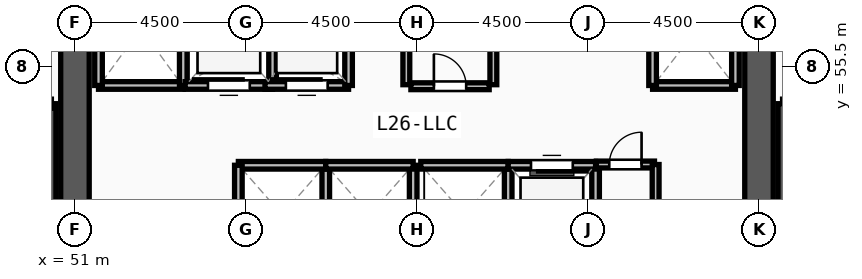
"""IFC4 building model, lengths in metres.
Left out: names, types, materials, properties, quantities, classifications, styles, units other than length and angle.
Written with IfcOpenShell. Run it as: python <this file> out.ifc"""

import sys

from ifc_helpers import new_model, si_unit, direction, frame, frame_2d, origin, place, context, subcontext, project, spatial, rectangle, extrude, source, transform, mapped, element, fill, save


model = new_model("IFC4")
c1 = context("Model", 3, precision=1e-05, world=origin(), true_north=direction((0.0, 1.0)))
c2 = subcontext(c1, "Body", "Model", "MODEL_VIEW")
j1 = project(units=[si_unit("LENGTHUNIT", "METRE"), si_unit("PLANEANGLEUNIT", "RADIAN")], contexts=[c1])
p1 = place(None, origin())
s1 = spatial("IfcSite", under=j1, at=p1, CompositionType="ELEMENT")
p2 = place(p1, origin())
s2 = spatial("IfcBuilding", under=s1, at=p2, CompositionType="ELEMENT")
p3 = place(p2, frame((0.0, 0.0, 102.0)))
s3 = spatial("IfcBuildingStorey", under=s2, at=p3, CompositionType="ELEMENT", Elevation=102.0)
p4 = place(p3, frame((69.0, 60.75, 0.0), z_axis=(0.0, 0.0, 1.0), x_axis=(0.0, -1.0, 0.0)))
e1 = element("IfcWall", 1, at=p4, inside=s3, PredefinedType="SHEAR", context=c2, shape_type="SweptSolid", body=[
    extrude(rectangle(XDim=13.5, YDim=0.75, at=frame_2d((6.75, 0.0))), origin(), (0.0, 0.0, 1.0), 3.57),
])
m1 = source(origin(), c2, "Body", "SweptSolid", [
    extrude(rectangle(XDim=1.2, YDim=2.2, at=frame_2d((0.6, 1.1))), frame((0.0, 0.385, 0.0), z_axis=(0.0, -1.0, 0.0), x_axis=(1.0, 0.0, 0.0)), (0.0, 0.0, 1.0), 0.77),
])
p5 = place(p4, frame((1.2, 0.0, 0.0)))
e2 = element("IfcOpeningElement", 2, at=p5, cuts=e1, PredefinedType="OPENING", context=c2, shape_type="MappedRepresentation", body=[
    mapped(m1, transform((0.0, 0.0, 0.0), x_axis=(1.0, 0.0, 0.0), y_axis=(0.0, 1.0, 0.0), z_axis=(0.0, 0.0, 1.0), scale=1.0)),
])
p6 = place(p3, frame((51.0, 47.25, 0.0), z_axis=(0.0, 0.0, 1.0), x_axis=(0.0, 1.0, 0.0)))
e3 = element("IfcWall", 3, at=p6, inside=s3, PredefinedType="SHEAR", context=c2, shape_type="SweptSolid", body=[
    extrude(rectangle(XDim=13.5, YDim=0.75, at=frame_2d((6.75, 0.0))), origin(), (0.0, 0.0, 1.0), 3.57),
])
for number, where, z_axis, x_axis in (
    (4, (50.38, 46.7, 0.0), (0.0, 0.0, 1.0), (0.0, 1.0, 0.0)),
    (5, (69.62, 54.52, 0.0), (0.0, 0.0, 1.0), (0.0, -1.0, 0.0)),
):
    element("IfcWall", number, at=place(p3, frame(where, z_axis=z_axis, x_axis=x_axis)), inside=s3, PredefinedType="SOLIDWALL", context=c2, shape_type="SweptSolid", body=[
        extrude(rectangle(XDim=7.82, YDim=0.24, at=frame_2d((3.91, 0.0))), origin(), (0.0, 0.0, 1.0), 3.57),
    ])
p7 = place(p3, frame((51.62, 55.0, 0.0), z_axis=(0.0, 0.0, 1.0), x_axis=(1.0, 0.0, 0.0)))
e6 = element("IfcWall", 6, at=p7, inside=s3, PredefinedType="SOLIDWALL", context=c2, shape_type="SweptSolid", body=[
    extrude(rectangle(XDim=2.23, YDim=0.2, at=frame_2d((1.115, 0.0))), origin(), (0.0, 0.0, 1.0), 3.57),
])
for number, where, z_axis, x_axis in (
    (7, (53.85, 55.0, 0.0), (0.0, 0.0, 1.0), (0.0, 1.0, 0.0)),
    (8, (51.62, 58.0, 0.0), (0.0, 0.0, 1.0), (0.0, -1.0, 0.0)),
):
    element("IfcWall", number, at=place(p3, frame(where, z_axis=z_axis, x_axis=x_axis)), inside=s3, PredefinedType="SOLIDWALL", context=c2, shape_type="SweptSolid", body=[
        extrude(rectangle(XDim=3.0, YDim=0.2, at=frame_2d((1.5, 0.0))), origin(), (0.0, 0.0, 1.0), 3.57),
    ])
p8 = place(p3, frame((66.2, 55.0, 0.0), z_axis=(0.0, 0.0, 1.0), x_axis=(1.0, 0.0, 0.0)))
e9 = element("IfcWall", 9, at=p8, inside=s3, PredefinedType="SOLIDWALL", context=c2, shape_type="SweptSolid", body=[
    extrude(rectangle(XDim=2.18, YDim=0.2, at=frame_2d((1.09, 0.0))), origin(), (0.0, 0.0, 1.0), 3.57),
])
for number, where, z_axis, x_axis in (
    (10, (68.38, 55.0, 0.0), (0.0, 0.0, 1.0), (0.0, 1.0, 0.0)),
    (11, (66.2, 57.75, 0.0), (0.0, 0.0, 1.0), (0.0, -1.0, 0.0)),
):
    element("IfcWall", number, at=place(p3, frame(where, z_axis=z_axis, x_axis=x_axis)), inside=s3, PredefinedType="SOLIDWALL", context=c2, shape_type="SweptSolid", body=[
        extrude(rectangle(XDim=2.75, YDim=0.2, at=frame_2d((1.375, 0.0))), origin(), (0.0, 0.0, 1.0), 3.57),
    ])
p9 = place(p3, frame((57.6, 50.3, 0.0), z_axis=(0.0, 0.0, 1.0), x_axis=(0.0, 1.0, 0.0)))
e12 = element("IfcWall", 12, at=p9, inside=s3, PredefinedType="SOLIDWALL", context=c2, shape_type="SweptSolid", body=[
    extrude(rectangle(XDim=2.6, YDim=0.2, at=frame_2d((1.3, 0.0))), origin(), (0.0, 0.0, 1.0), 3.57),
])
p10 = place(p3, frame((57.6, 52.9, 0.0), z_axis=(0.0, 0.0, 1.0), x_axis=(-1.0, 0.0, 0.0)))
e13 = element("IfcWall", 13, at=p10, inside=s3, PredefinedType="SOLIDWALL", context=c2, shape_type="SweptSolid", body=[
    extrude(rectangle(XDim=2.3, YDim=0.2, at=frame_2d((1.15, 0.0))), origin(), (0.0, 0.0, 1.0), 3.57),
])
for number, where, z_axis, x_axis in (
    (14, (55.3, 52.9, 0.0), (0.0, 0.0, 1.0), (0.0, -1.0, 0.0)),
    (15, (59.9, 50.3, 0.0), (0.0, 0.0, 1.0), (0.0, 1.0, 0.0)),
):
    element("IfcWall", number, at=place(p3, frame(where, z_axis=z_axis, x_axis=x_axis)), inside=s3, PredefinedType="SOLIDWALL", context=c2, shape_type="SweptSolid", body=[
        extrude(rectangle(XDim=2.6, YDim=0.2, at=frame_2d((1.3, 0.0))), origin(), (0.0, 0.0, 1.0), 3.57),
    ])
p11 = place(p3, frame((59.9, 52.9, 0.0), z_axis=(0.0, 0.0, 1.0), x_axis=(-1.0, 0.0, 0.0)))
e16 = element("IfcWall", 16, at=p11, inside=s3, PredefinedType="SOLIDWALL", context=c2, shape_type="SweptSolid", body=[
    extrude(rectangle(XDim=2.3, YDim=0.2, at=frame_2d((1.15, 0.0))), origin(), (0.0, 0.0, 1.0), 3.57),
])
p12 = place(p3, frame((62.4, 50.3, 0.0), z_axis=(0.0, 0.0, 1.0), x_axis=(0.0, 1.0, 0.0)))
e17 = element("IfcWall", 17, at=p12, inside=s3, PredefinedType="SOLIDWALL", context=c2, shape_type="SweptSolid", body=[
    extrude(rectangle(XDim=2.6, YDim=0.2, at=frame_2d((1.3, 0.0))), origin(), (0.0, 0.0, 1.0), 3.57),
])
p13 = place(p3, frame((62.4, 52.9, 0.0), z_axis=(0.0, 0.0, 1.0), x_axis=(-1.0, 0.0, 0.0)))
e18 = element("IfcWall", 18, at=p13, inside=s3, PredefinedType="SOLIDWALL", context=c2, shape_type="SweptSolid", body=[
    extrude(rectangle(XDim=2.3, YDim=0.2, at=frame_2d((1.15, 0.0))), origin(), (0.0, 0.0, 1.0), 3.57),
])
p14 = place(p3, frame((64.7, 50.3, 0.0), z_axis=(0.0, 0.0, 1.0), x_axis=(0.0, 1.0, 0.0)))
e19 = element("IfcWall", 19, at=p14, inside=s3, PredefinedType="SOLIDWALL", context=c2, shape_type="SweptSolid", body=[
    extrude(rectangle(XDim=2.6, YDim=0.2, at=frame_2d((1.3, 0.0))), origin(), (0.0, 0.0, 1.0), 3.57),
])
p15 = place(p3, frame((64.7, 52.9, 0.0), z_axis=(0.0, 0.0, 1.0), x_axis=(-1.0, 0.0, 0.0)))
e20 = element("IfcWall", 20, at=p15, inside=s3, PredefinedType="SOLIDWALL", context=c2, shape_type="SweptSolid", body=[
    extrude(rectangle(XDim=2.3, YDim=0.2, at=frame_2d((1.15, 0.0))), origin(), (0.0, 0.0, 1.0), 3.57),
])
m2 = source(origin(), c2, "Body", "SweptSolid", [
    extrude(rectangle(XDim=1.1, YDim=2.2, at=frame_2d((0.55, 1.1))), frame((0.0, 0.11, 0.0), z_axis=(0.0, -1.0, 0.0), x_axis=(1.0, 0.0, 0.0)), (0.0, 0.0, 1.0), 0.22),
])
p16 = place(p15, frame((0.6, 0.0, 0.0)))
e21 = element("IfcOpeningElement", 21, at=p16, cuts=e20, PredefinedType="OPENING", context=c2, shape_type="MappedRepresentation", body=[
    mapped(m2, transform((0.0, 0.0, 0.0), x_axis=(1.0, 0.0, 0.0), y_axis=(0.0, 1.0, 0.0), z_axis=(0.0, 0.0, 1.0), scale=1.0)),
])
p17 = place(p3, frame((53.9, 55.0, 0.0), z_axis=(0.0, 0.0, 1.0), x_axis=(1.0, 0.0, 0.0)))
e22 = element("IfcWall", 22, at=p17, inside=s3, PredefinedType="SOLIDWALL", context=c2, shape_type="SweptSolid", body=[
    extrude(rectangle(XDim=2.3, YDim=0.2, at=frame_2d((1.15, 0.0))), origin(), (0.0, 0.0, 1.0), 3.57),
])
p18 = place(p17, frame((0.6, 0.0, 0.0)))
e23 = element("IfcOpeningElement", 23, at=p18, cuts=e22, PredefinedType="OPENING", context=c2, shape_type="MappedRepresentation", body=[
    mapped(m2, transform((0.0, 0.0, 0.0), x_axis=(1.0, 0.0, 0.0), y_axis=(0.0, 1.0, 0.0), z_axis=(0.0, 0.0, 1.0), scale=1.0)),
])
p19 = place(p3, frame((56.2, 55.0, 0.0), z_axis=(0.0, 0.0, 1.0), x_axis=(0.0, 1.0, 0.0)))
e24 = element("IfcWall", 24, at=p19, inside=s3, PredefinedType="SOLIDWALL", context=c2, shape_type="SweptSolid", body=[
    extrude(rectangle(XDim=2.6, YDim=0.2, at=frame_2d((1.3, 0.0))), origin(), (0.0, 0.0, 1.0), 3.57),
])
p20 = place(p3, frame((56.0, 55.0, 0.0), z_axis=(0.0, 0.0, 1.0), x_axis=(1.0, 0.0, 0.0)))
e25 = element("IfcWall", 25, at=p20, inside=s3, PredefinedType="SOLIDWALL", context=c2, shape_type="SweptSolid", body=[
    extrude(rectangle(XDim=2.2, YDim=0.2, at=frame_2d((1.1, 0.0))), origin(), (0.0, 0.0, 1.0), 3.57),
])
p21 = place(p20, frame((0.55, 0.0, 0.0)))
e26 = element("IfcOpeningElement", 26, at=p21, cuts=e25, PredefinedType="OPENING", context=c2, shape_type="MappedRepresentation", body=[
    mapped(m2, transform((0.0, 0.0, 0.0), x_axis=(1.0, 0.0, 0.0), y_axis=(0.0, 1.0, 0.0), z_axis=(0.0, 0.0, 1.0), scale=1.0)),
])
p22 = place(p3, frame((58.2, 55.0, 0.0), z_axis=(0.0, 0.0, 1.0), x_axis=(0.0, 1.0, 0.0)))
e27 = element("IfcWall", 27, at=p22, inside=s3, PredefinedType="SOLIDWALL", context=c2, shape_type="SweptSolid", body=[
    extrude(rectangle(XDim=2.6, YDim=0.2, at=frame_2d((1.3, 0.0))), origin(), (0.0, 0.0, 1.0), 3.57),
])
p23 = place(p3, frame((59.84, 54.98, 0.0), z_axis=(0.0, 0.0, 1.0), x_axis=(1.0, 0.0, 0.0)))
e28 = element("IfcWall", 28, at=p23, inside=s3, PredefinedType="PARTITIONING", context=c2, shape_type="SweptSolid", body=[
    extrude(rectangle(XDim=2.06, YDim=0.18, at=frame_2d((1.03, 0.0))), origin(), (0.0, 0.0, 1.0), 3.57),
])
m3 = source(origin(), c2, "Body", "SweptSolid", [
    extrude(rectangle(XDim=0.85, YDim=2.1, at=frame_2d((0.425, 1.05))), frame((0.0, 0.1, 0.0), z_axis=(0.0, -1.0, 0.0), x_axis=(1.0, 0.0, 0.0)), (0.0, 0.0, 1.0), 0.2),
])
p24 = place(p23, frame((0.605, 0.0, 0.0)))
e29 = element("IfcOpeningElement", 29, at=p24, cuts=e28, PredefinedType="OPENING", context=c2, shape_type="MappedRepresentation", body=[
    mapped(m3, transform((0.0, 0.0, 0.0), x_axis=(1.0, 0.0, 0.0), y_axis=(0.0, 1.0, 0.0), z_axis=(0.0, 0.0, 1.0), scale=1.0)),
])
p25 = place(p3, frame((64.72, 52.92, 0.0), z_axis=(0.0, 0.0, 1.0), x_axis=(1.0, 0.0, 0.0)))
e30 = element("IfcWall", 30, at=p25, inside=s3, PredefinedType="PARTITIONING", context=c2, shape_type="SweptSolid", body=[
    extrude(rectangle(XDim=1.53, YDim=0.18, at=frame_2d((0.765, 0.0))), origin(), (0.0, 0.0, 1.0), 3.57),
])
p26 = place(p25, frame((0.34, 0.0, 0.0)))
e31 = element("IfcOpeningElement", 31, at=p26, cuts=e30, PredefinedType="OPENING", context=c2, shape_type="MappedRepresentation", body=[
    mapped(m3, transform((0.0, 0.0, 0.0), x_axis=(1.0, 0.0, 0.0), y_axis=(0.0, 1.0, 0.0), z_axis=(0.0, 0.0, 1.0), scale=1.0)),
])
for number, where, z_axis, x_axis in (
    (32, (59.72, 55.02, 0.0), (0.0, 0.0, 1.0), (0.0, 1.0, 0.0)),
    (33, (62.01, 55.02, 0.0), (0.0, 0.0, 1.0), (0.0, 1.0, 0.0)),
):
    element("IfcWall", number, at=place(p3, frame(where, z_axis=z_axis, x_axis=x_axis)), inside=s3, PredefinedType="PARTITIONING", context=c2, shape_type="SweptSolid", body=[
        extrude(rectangle(XDim=1.73, YDim=0.18, at=frame_2d((0.865, 0.0))), origin(), (0.0, 0.0, 1.0), 3.57),
    ])
p27 = place(p3, frame((66.28, 50.35, 0.0), z_axis=(0.0, 0.0, 1.0), x_axis=(0.0, 1.0, 0.0)))
e34 = element("IfcWall", 34, at=p27, inside=s3, PredefinedType="PARTITIONING", context=c2, shape_type="SweptSolid", body=[
    extrude(rectangle(XDim=2.57, YDim=0.18, at=frame_2d((1.285, 0.0))), origin(), (0.0, 0.0, 1.0), 3.57),
])
m4 = source(origin(), c2, "Body", "SweptSolid", [
    extrude(rectangle(XDim=1.1, YDim=2.2, at=frame_2d((0.55, 1.1))), frame((0.0, 0.025, 0.0), z_axis=(0.0, -1.0, 0.0), x_axis=(1.0, 0.0, 0.0)), (0.0, 0.0, 1.0), 0.05),
])
p28 = place(p16, origin())
e35 = element("IfcDoor", 35, at=p28, inside=s3, OperationType="SLIDING_TO_LEFT", PredefinedType="DOOR", context=c2, shape_type="MappedRepresentation", body=[
    mapped(m4, transform((0.0, 0.0, 0.0), x_axis=(1.0, 0.0, 0.0), y_axis=(0.0, 1.0, 0.0), z_axis=(0.0, 0.0, 1.0), scale=1.0)),
])
fill(e21, e35)
p29 = place(p18, origin())
e36 = element("IfcDoor", 36, at=p29, inside=s3, OperationType="SLIDING_TO_LEFT", PredefinedType="DOOR", context=c2, shape_type="MappedRepresentation", body=[
    mapped(m4, transform((0.0, 0.0, 0.0), x_axis=(1.0, 0.0, 0.0), y_axis=(0.0, 1.0, 0.0), z_axis=(0.0, 0.0, 1.0), scale=1.0)),
])
fill(e23, e36)
p30 = place(p21, origin())
e37 = element("IfcDoor", 37, at=p30, inside=s3, OperationType="SLIDING_TO_LEFT", PredefinedType="DOOR", context=c2, shape_type="MappedRepresentation", body=[
    mapped(m4, transform((0.0, 0.0, 0.0), x_axis=(1.0, 0.0, 0.0), y_axis=(0.0, 1.0, 0.0), z_axis=(0.0, 0.0, 1.0), scale=1.0)),
])
fill(e26, e37)
m5 = source(origin(), c2, "Body", "SweptSolid", [
    extrude(rectangle(XDim=0.85, YDim=2.1, at=frame_2d((0.425, 1.05))), frame((0.0, 0.025, 0.0), z_axis=(0.0, -1.0, 0.0), x_axis=(1.0, 0.0, 0.0)), (0.0, 0.0, 1.0), 0.05),
])
p31 = place(p24, origin())
e38 = element("IfcDoor", 38, at=p31, inside=s3, OperationType="SINGLE_SWING_LEFT", PredefinedType="DOOR", context=c2, shape_type="MappedRepresentation", body=[
    mapped(m5, transform((0.0, 0.0, 0.0), x_axis=(1.0, 0.0, 0.0), y_axis=(0.0, 1.0, 0.0), z_axis=(0.0, 0.0, 1.0), scale=1.0)),
])
fill(e29, e38)
p32 = place(p26, origin())
e39 = element("IfcDoor", 39, at=p32, inside=s3, OperationType="SINGLE_SWING_RIGHT", PredefinedType="DOOR", context=c2, shape_type="MappedRepresentation", body=[
    mapped(m5, transform((0.0, 0.0, 0.0), x_axis=(1.0, 0.0, 0.0), y_axis=(0.0, 1.0, 0.0), z_axis=(0.0, 0.0, 1.0), scale=1.0)),
])
fill(e31, e39)
save(model, sys.argv[1])
